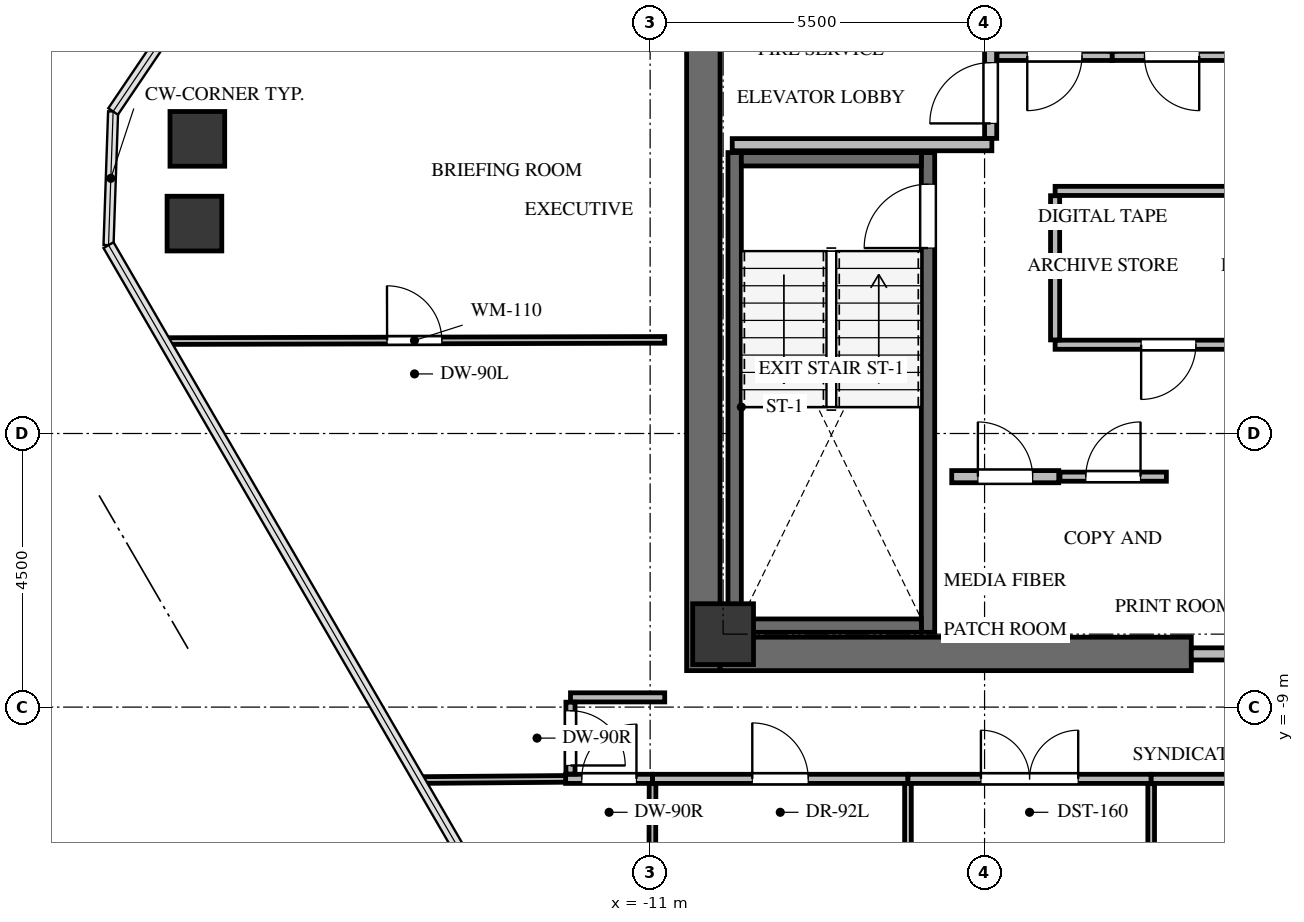
"""IFC4 building model, lengths in metres.
Left out: names, types, materials, properties, quantities, classifications, styles, units other than length and angle.
Written with IfcOpenShell. Run it as: python <this file> out.ifc"""

import sys

from ifc_helpers import new_model, si_unit, direction, frame, frame_2d, origin, origin_2d, place, context, subcontext, project, spatial, rectangle, extrude, source, transform, mapped, element, fill, save


model = new_model("IFC4")
c1 = context("Model", 3, precision=1e-05, world=origin(), true_north=direction((0.0, 1.0)))
c2 = subcontext(c1, "Body", "Model", "MODEL_VIEW")
j1 = project(units=[si_unit("LENGTHUNIT", "METRE"), si_unit("PLANEANGLEUNIT", "RADIAN")], contexts=[c1])
p1 = place(None, origin())
s1 = spatial("IfcSite", under=j1, at=p1, CompositionType="ELEMENT")
p2 = place(p1, origin())
s2 = spatial("IfcBuilding", under=s1, at=p2, CompositionType="ELEMENT")
p3 = place(p2, frame((0.0, 0.0, 244.7)))
s3 = spatial("IfcBuildingStorey", under=s2, at=p3, CompositionType="ELEMENT", Elevation=244.7)
p4 = place(p3, frame((-10.125, -8.4, 0.0), z_axis=(0.0, 0.0, 1.0), x_axis=(0.0, 1.0, 0.0)))
e1 = element("IfcWall", 1, at=p4, inside=s3, PredefinedType="SHEAR", context=c2, shape_type="SweptSolid", body=[
    extrude(rectangle(XDim=16.8, YDim=0.55, at=frame_2d((8.4, 0.0))), origin(), (0.0, 0.0, 1.0), 3.3),
])
p5 = place(p3, frame((-9.85, -8.125, 0.0), z_axis=(0.0, 0.0, 1.0), x_axis=(1.0, 0.0, 0.0)))
e2 = element("IfcWall", 2, at=p5, inside=s3, PredefinedType="SHEAR", context=c2, shape_type="SweptSolid", body=[
    extrude(rectangle(XDim=7.75, YDim=0.55, at=frame_2d((3.875, 0.0))), origin(), (0.0, 0.0, 1.0), 3.3),
])
p6 = place(p3, frame((-6.43, -7.77, -0.24), z_axis=(0.0, 0.0, 1.0), x_axis=(0.0, 1.0, 0.0)))
e3 = element("IfcWall", 3, at=p6, inside=s3, PredefinedType="SHEAR", context=c2, shape_type="SweptSolid", body=[
    extrude(rectangle(XDim=7.89, YDim=0.22, at=frame_2d((3.945, 0.0))), origin(), (0.0, 0.0, 1.0), 3.3),
])
p7 = place(p6, frame((6.32, 0.0, 0.0)))
e4 = element("IfcOpeningElement", 4, at=p7, cuts=e3, PredefinedType="OPENING", context=c2, shape_type="SweptSolid", body=[
    extrude(rectangle(XDim=1.05, YDim=2.15, at=frame_2d((0.525, 1.075))), frame((0.0, 0.12, 0.0), z_axis=(0.0, -1.0, 0.0), x_axis=(1.0, 0.0, 0.0)), (0.0, 0.0, 1.0), 0.24),
])
p8 = place(p3, frame((-9.61, 0.12, -0.24), z_axis=(0.0, 0.0, 1.0), x_axis=(0.0, -1.0, 0.0)))
e5 = element("IfcWall", 5, at=p8, inside=s3, PredefinedType="SHEAR", context=c2, shape_type="SweptSolid", body=[
    extrude(rectangle(XDim=7.89, YDim=0.22, at=frame_2d((3.945, 0.0))), origin(), (0.0, 0.0, 1.0), 3.3),
])
for number, where, z_axis, x_axis in (
    (6, (-9.5, -7.66, -0.24), (0.0, 0.0, 1.0), (1.0, 0.0, 0.0)),
    (7, (-6.54, 0.01, -0.24), (0.0, 0.0, 1.0), (-1.0, 0.0, 0.0)),
):
    element("IfcWall", number, at=place(p3, frame(where, z_axis=z_axis, x_axis=x_axis)), inside=s3, PredefinedType="SHEAR", context=c2, shape_type="SweptSolid", body=[
        extrude(rectangle(XDim=2.96, YDim=0.22, at=frame_2d((1.48, 0.0))), origin(), (0.0, 0.0, 1.0), 3.3),
    ])
m1 = source(origin(), c2, "Body", "SweptSolid", [
    extrude(rectangle(XDim=1.0, YDim=1.0, at=origin_2d()), origin(), (0.0, 0.0, 1.0), 3.3),
])
p9 = place(p3, frame((-9.8, -7.8, -0.24), z_axis=(0.0, 0.0, 1.0), x_axis=(1.0, 0.0, 0.0)))
e8 = element("IfcColumn", 8, at=p9, inside=s3, PredefinedType="COLUMN", context=c2, shape_type="MappedRepresentation", body=[
    mapped(m1, transform((0.0, 0.0, 0.0), x_axis=(1.0, 0.0, 0.0), y_axis=(0.0, 1.0, 0.0), z_axis=(0.0, 0.0, 1.0), scale=1.0)),
])
m2 = source(origin(), c2, "Body", "SweptSolid", [
    extrude(rectangle(XDim=0.9, YDim=0.9, at=origin_2d()), origin(), (0.0, 0.0, 1.0), 3.3),
])
for number, where, z_axis, x_axis in (
    (9, (-18.494, -1.048, -0.24), (0.0, 0.0, 1.0), (1.0, 0.0, 0.0)),
    (10, (-18.446, 0.346, -0.24), (0.0, 0.0, 1.0), (1.0, 0.0, 0.0)),
):
    element("IfcColumn", number, at=place(p3, frame(where, z_axis=z_axis, x_axis=x_axis)), inside=s3, PredefinedType="COLUMN", context=c2, shape_type="MappedRepresentation", body=[
        mapped(m2, transform((0.0, 0.0, 0.0), x_axis=(1.0, 0.0, 0.0), y_axis=(0.0, 1.0, 0.0), z_axis=(0.0, 0.0, 1.0), scale=1.0)),
    ])
p10 = place(p3, frame((-2.1, -8.125, 0.0), z_axis=(0.0, 0.0, 1.0), x_axis=(1.0, 0.0, 0.0)))
e11 = element("IfcWall", 11, at=p10, inside=s3, PredefinedType="SOLIDWALL", context=c2, shape_type="SweptSolid", body=[
    extrude(rectangle(XDim=4.2, YDim=0.2, at=frame_2d((2.1, 0.0))), origin(), (0.0, 0.0, 1.0), 3.045),
])
p11 = place(p10, frame((1.2, 0.0, 0.0)))
e12 = element("IfcOpeningElement", 12, at=p11, cuts=e11, PredefinedType="OPENING", context=c2, shape_type="SweptSolid", body=[
    extrude(rectangle(XDim=1.8, YDim=2.15, at=frame_2d((0.9, 1.075))), frame((0.0, 0.11, 0.0), z_axis=(0.0, -1.0, 0.0), x_axis=(1.0, 0.0, 0.0)), (0.0, 0.0, 1.0), 0.22),
])
p12 = place(p3, frame((-9.65, 0.25, 0.0), z_axis=(0.0, 0.0, 1.0), x_axis=(1.0, 0.0, 0.0)))
e13 = element("IfcWall", 13, at=p12, inside=s3, PredefinedType="SOLIDWALL", context=c2, shape_type="SweptSolid", body=[
    extrude(rectangle(XDim=4.27, YDim=0.2, at=frame_2d((2.135, 0.0))), origin(), (0.0, 0.0, 1.0), 3.045),
])
p13 = place(p3, frame((-5.4, 0.354, 0.0), z_axis=(0.0, 0.0, 1.0), x_axis=(0.0, 1.0, 0.0)))
e14 = element("IfcWall", 14, at=p13, inside=s3, PredefinedType="SOLIDWALL", context=c2, shape_type="SweptSolid", body=[
    extrude(rectangle(XDim=4.026, YDim=0.2, at=frame_2d((2.013, 0.0))), origin(), (0.0, 0.0, 1.0), 3.045),
])
p14 = place(p13, frame((0.246, 0.0, 0.0)))
e15 = element("IfcOpeningElement", 15, at=p14, cuts=e14, PredefinedType="OPENING", context=c2, shape_type="SweptSolid", body=[
    extrude(rectangle(XDim=1.0, YDim=2.15, at=frame_2d((0.5, 1.075))), frame((0.0, 0.11, 0.0), z_axis=(0.0, -1.0, 0.0), x_axis=(1.0, 0.0, 0.0)), (0.0, 0.0, 1.0), 0.22),
])
p15 = place(p3, frame((-6.04, -5.21, 0.0), z_axis=(0.0, 0.0, 1.0), x_axis=(1.0, 0.0, 0.0)))
e16 = element("IfcWall", 16, at=p15, inside=s3, PredefinedType="SOLIDWALL", context=c2, shape_type="SweptSolid", body=[
    extrude(rectangle(XDim=1.76, YDim=0.2, at=frame_2d((0.88, 0.0))), origin(), (0.0, 0.0, 1.0), 3.045),
])
p16 = place(p15, frame((0.43, 0.0, 0.0)))
e17 = element("IfcOpeningElement", 17, at=p16, cuts=e16, PredefinedType="OPENING", context=c2, shape_type="SweptSolid", body=[
    extrude(rectangle(XDim=0.9, YDim=2.05, at=frame_2d((0.45, 1.025))), frame((0.0, 0.11, 0.0), z_axis=(0.0, -1.0, 0.0), x_axis=(1.0, 0.0, 0.0)), (0.0, 0.0, 1.0), 0.22),
])
p17 = place(p3, frame((-4.26, -5.21, 0.0), z_axis=(0.0, 0.0, 1.0), x_axis=(1.0, 0.0, 0.0)))
e18 = element("IfcWall", 18, at=p17, inside=s3, PredefinedType="PARTITIONING", context=c2, shape_type="SweptSolid", body=[
    extrude(rectangle(XDim=1.75, YDim=0.15, at=frame_2d((0.875, 0.0))), origin(), (0.0, 0.0, 1.0), 3.045),
])
p18 = place(p17, frame((0.425, 0.0, 0.0)))
e19 = element("IfcOpeningElement", 19, at=p18, cuts=e18, PredefinedType="OPENING", context=c2, shape_type="SweptSolid", body=[
    extrude(rectangle(XDim=0.9, YDim=2.05, at=frame_2d((0.45, 1.025))), frame((0.0, 0.085, 0.0), z_axis=(0.0, -1.0, 0.0), x_axis=(1.0, 0.0, 0.0)), (0.0, 0.0, 1.0), 0.17),
])
p19 = place(p3, frame((-0.61, -3.04, 0.0), z_axis=(0.0, 0.0, 1.0), x_axis=(-1.0, 0.0, 0.0)))
e20 = element("IfcWall", 20, at=p19, inside=s3, PredefinedType="PARTITIONING", context=c2, shape_type="SweptSolid", body=[
    extrude(rectangle(XDim=3.73, YDim=0.15, at=frame_2d((1.865, 0.0))), origin(), (0.0, 0.0, 1.0), 3.045),
])
p20 = place(p19, frame((1.415, 0.0, 0.0)))
e21 = element("IfcOpeningElement", 21, at=p20, cuts=e20, PredefinedType="OPENING", context=c2, shape_type="SweptSolid", body=[
    extrude(rectangle(XDim=0.9, YDim=2.05, at=frame_2d((0.45, 1.025))), frame((0.0, 0.085, 0.0), z_axis=(0.0, -1.0, 0.0), x_axis=(1.0, 0.0, 0.0)), (0.0, 0.0, 1.0), 0.17),
])
p21 = place(p3, frame((-4.34, -0.51, 0.0), z_axis=(0.0, 0.0, 1.0), x_axis=(1.0, 0.0, 0.0)))
e22 = element("IfcWall", 22, at=p21, inside=s3, PredefinedType="PARTITIONING", context=c2, shape_type="SweptSolid", body=[
    extrude(rectangle(XDim=3.73, YDim=0.15, at=frame_2d((1.865, 0.0))), origin(), (0.0, 0.0, 1.0), 3.045),
])
p22 = place(p3, frame((-4.34, -2.961, 0.0), z_axis=(0.0, 0.0, 1.0), x_axis=(0.0, 1.0, 0.0)))
e23 = element("IfcWall", 23, at=p22, inside=s3, PredefinedType="PARTITIONING", context=c2, shape_type="SweptSolid", body=[
    extrude(rectangle(XDim=2.372, YDim=0.15, at=frame_2d((1.186, 0.0))), origin(), (0.0, 0.0, 1.0), 3.045),
])
p23 = place(p3, frame((-3.4, 1.71, 0.0), z_axis=(0.0, 0.0, 1.0), x_axis=(-1.0, 0.0, 0.0)))
e24 = element("IfcWall", 24, at=p23, inside=s3, PredefinedType="PARTITIONING", context=c2, shape_type="SweptSolid", body=[
    extrude(rectangle(XDim=1.896, YDim=0.15, at=frame_2d((0.948, 0.0))), origin(), (0.0, 0.0, 1.0), 3.045),
])
p24 = place(p23, frame((0.498, 0.0, 0.0)))
e25 = element("IfcOpeningElement", 25, at=p24, cuts=e24, PredefinedType="OPENING", context=c2, shape_type="SweptSolid", body=[
    extrude(rectangle(XDim=0.9, YDim=2.05, at=frame_2d((0.45, 1.025))), frame((0.0, 0.085, 0.0), z_axis=(0.0, -1.0, 0.0), x_axis=(1.0, 0.0, 0.0)), (0.0, 0.0, 1.0), 0.17),
])
p25 = place(p3, frame((-1.44, 1.71, 0.0), z_axis=(0.0, 0.0, 1.0), x_axis=(-1.0, 0.0, 0.0)))
e26 = element("IfcWall", 26, at=p25, inside=s3, PredefinedType="PARTITIONING", context=c2, shape_type="SweptSolid", body=[
    extrude(rectangle(XDim=1.96, YDim=0.15, at=frame_2d((0.98, 0.0))), origin(), (0.0, 0.0, 1.0), 3.045),
])
p26 = place(p25, frame((0.53, 0.0, 0.0)))
e27 = element("IfcOpeningElement", 27, at=p26, cuts=e26, PredefinedType="OPENING", context=c2, shape_type="SweptSolid", body=[
    extrude(rectangle(XDim=0.9, YDim=2.05, at=frame_2d((0.45, 1.025))), frame((0.0, 0.085, 0.0), z_axis=(0.0, -1.0, 0.0), x_axis=(1.0, 0.0, 0.0)), (0.0, 0.0, 1.0), 0.17),
])
p27 = place(p3, frame((-12.39, -10.18, 0.0), z_axis=(0.0, 0.0, 1.0), x_axis=(1.0, 0.0, 0.0)))
e28 = element("IfcWall", 28, at=p27, inside=s3, PredefinedType="PARTITIONING", context=c2, shape_type="SweptSolid", body=[
    extrude(rectangle(XDim=1.43, YDim=0.15, at=frame_2d((0.715, 0.0))), origin(), (0.0, 0.0, 1.0), 3.045),
])
p28 = place(p27, frame((0.265, 0.0, 0.0)))
e29 = element("IfcOpeningElement", 29, at=p28, cuts=e28, PredefinedType="OPENING", context=c2, shape_type="SweptSolid", body=[
    extrude(rectangle(XDim=0.9, YDim=2.05, at=frame_2d((0.45, 1.025))), frame((0.0, 0.085, 0.0), z_axis=(0.0, -1.0, 0.0), x_axis=(1.0, 0.0, 0.0)), (0.0, 0.0, 1.0), 0.17),
])
p29 = place(p3, frame((-10.96, -10.18, 0.0), z_axis=(0.0, 0.0, 1.0), x_axis=(1.0, 0.0, 0.0)))
e30 = element("IfcWall", 30, at=p29, inside=s3, PredefinedType="PARTITIONING", context=c2, shape_type="SweptSolid", body=[
    extrude(rectangle(XDim=4.2, YDim=0.15, at=frame_2d((2.1, 0.0))), origin(), (0.0, 0.0, 1.0), 3.045),
])
p30 = place(p29, frame((1.64, 0.0, 0.0)))
e31 = element("IfcOpeningElement", 31, at=p30, cuts=e30, PredefinedType="OPENING", context=c2, shape_type="SweptSolid", body=[
    extrude(rectangle(XDim=0.92, YDim=2.1, at=frame_2d((0.46, 1.05))), frame((0.0, 0.085, 0.0), z_axis=(0.0, -1.0, 0.0), x_axis=(1.0, 0.0, 0.0)), (0.0, 0.0, 1.0), 0.17),
])
p31 = place(p3, frame((-6.76, -10.18, 0.0), z_axis=(0.0, 0.0, 1.0), x_axis=(1.0, 0.0, 0.0)))
e32 = element("IfcWall", 32, at=p31, inside=s3, PredefinedType="PARTITIONING", context=c2, shape_type="SweptSolid", body=[
    extrude(rectangle(XDim=4.0, YDim=0.15, at=frame_2d((2.0, 0.0))), origin(), (0.0, 0.0, 1.0), 2.301),
])
p32 = place(p31, frame((1.2, 0.0, 0.0)))
e33 = element("IfcOpeningElement", 33, at=p32, cuts=e32, PredefinedType="OPENING", context=c2, shape_type="SweptSolid", body=[
    extrude(rectangle(XDim=1.6, YDim=2.15, at=frame_2d((0.8, 1.075))), frame((0.0, 0.085, 0.0), z_axis=(0.0, -1.0, 0.0), x_axis=(1.0, 0.0, 0.0)), (0.0, 0.0, 1.0), 0.17),
])
p33 = place(p3, frame((-2.76, -10.18, 0.0), z_axis=(0.0, 0.0, 1.0), x_axis=(1.0, 0.0, 0.0)))
e34 = element("IfcWall", 34, at=p33, inside=s3, PredefinedType="PARTITIONING", context=c2, shape_type="SweptSolid", body=[
    extrude(rectangle(XDim=1.671, YDim=0.15, at=frame_2d((0.835, 0.0))), origin(), (0.0, 0.0, 1.0), 3.045),
])
p34 = place(p3, frame((-10.76, -8.84, 0.0), z_axis=(0.0, 0.0, 1.0), x_axis=(-1.0, 0.0, 0.0)))
e35 = element("IfcWall", 35, at=p34, inside=s3, PredefinedType="PARTITIONING", context=c2, shape_type="SweptSolid", body=[
    extrude(rectangle(XDim=1.55, YDim=0.15, at=frame_2d((0.775, 0.0))), origin(), (0.0, 0.0, 1.0), 3.045),
])
p35 = place(p3, frame((-12.31, -8.919, 0.0), z_axis=(0.0, 0.0, 1.0), x_axis=(0.0, -1.0, 0.0)))
e36 = element("IfcWall", 36, at=p35, inside=s3, PredefinedType="PARTITIONING", context=c2, shape_type="SweptSolid", body=[
    extrude(rectangle(XDim=1.182, YDim=0.15, at=frame_2d((0.591, 0.0))), origin(), (0.0, 0.0, 1.0), 3.045),
])
p36 = place(p35, frame((0.141, 0.0, 0.0)))
e37 = element("IfcOpeningElement", 37, at=p36, cuts=e36, PredefinedType="OPENING", context=c2, shape_type="SweptSolid", body=[
    extrude(rectangle(XDim=0.9, YDim=2.05, at=frame_2d((0.45, 1.025))), frame((0.0, 0.085, 0.0), z_axis=(0.0, -1.0, 0.0), x_axis=(1.0, 0.0, 0.0)), (0.0, 0.0, 1.0), 0.17),
])
p37 = place(p3, frame((-10.96, -10.259, 0.0), z_axis=(0.0, 0.0, 1.0), x_axis=(-0.003240981611, -0.999994748005, 0.0)))
e38 = element("IfcWall", 38, at=p37, inside=s3, PredefinedType="MOVABLE", context=c2, shape_type="SweptSolid", body=[
    extrude(rectangle(XDim=4.821, YDim=0.11, at=frame_2d((2.411, 0.0))), origin(), (0.0, 0.0, 1.0), 2.399),
])
p38 = place(p3, frame((-14.802, -10.2, 0.0), z_axis=(0.0, 0.0, 1.0), x_axis=(0.999968020968, 0.007997314604, 0.0)))
e39 = element("IfcWall", 39, at=p38, inside=s3, PredefinedType="MOVABLE", context=c2, shape_type="SweptSolid", body=[
    extrude(rectangle(XDim=2.412, YDim=0.11, at=frame_2d((1.206, 0.0))), origin(), (0.0, 0.0, 1.0), 2.399),
])
p39 = place(p3, frame((-6.76, -10.259, 0.0), z_axis=(0.0, 0.0, 1.0), x_axis=(0.0, -1.0, 0.0)))
e40 = element("IfcWall", 40, at=p39, inside=s3, PredefinedType="MOVABLE", context=c2, shape_type="SweptSolid", body=[
    extrude(rectangle(XDim=6.927, YDim=0.11, at=frame_2d((3.463, 0.0))), origin(), (0.0, 0.0, 1.0), 2.301),
])
p40 = place(p3, frame((-2.76, -10.259, 0.0), z_axis=(0.0, 0.0, 1.0), x_axis=(0.0, -1.0, 0.0)))
e41 = element("IfcWall", 41, at=p40, inside=s3, PredefinedType="MOVABLE", context=c2, shape_type="SweptSolid", body=[
    extrude(rectangle(XDim=6.927, YDim=0.11, at=frame_2d((3.463, 0.0))), origin(), (0.0, 0.0, 1.0), 2.399),
])
p41 = place(p3, frame((-18.992, -2.98, 0.0), z_axis=(0.0, 0.0, 1.0), x_axis=(0.999997042683, 0.0024320004, 0.0)))
e42 = element("IfcWall", 42, at=p41, inside=s3, PredefinedType="MOVABLE", context=c2, shape_type="SweptSolid", body=[
    extrude(rectangle(XDim=8.232, YDim=0.11, at=frame_2d((4.116, 0.0))), origin(), (0.0, 0.0, 1.0), 2.399),
])
p42 = place(p41, frame((3.666, 0.0, 0.0)))
e43 = element("IfcOpeningElement", 43, at=p42, cuts=e42, PredefinedType="OPENING", context=c2, shape_type="SweptSolid", body=[
    extrude(rectangle(XDim=0.9, YDim=2.05, at=frame_2d((0.45, 1.025))), frame((0.0, 0.065, 0.0), z_axis=(0.0, -1.0, 0.0), x_axis=(1.0, 0.0, 0.0)), (0.0, 0.0, 1.0), 0.13),
])
m3 = source(origin(), c2, "Body", "SweptSolid", [
    extrude(rectangle(XDim=1.05, YDim=2.15, at=frame_2d((0.525, 1.075))), frame((0.0, 0.025, 0.0), z_axis=(0.0, -1.0, 0.0), x_axis=(1.0, 0.0, 0.0)), (0.0, 0.0, 1.0), 0.05),
])
p43 = place(p7, origin())
e44 = element("IfcDoor", 44, at=p43, inside=s3, OperationType="SINGLE_SWING_LEFT", PredefinedType="DOOR", context=c2, shape_type="MappedRepresentation", body=[
    mapped(m3, transform((0.0, 0.0, 0.0), x_axis=(1.0, 0.0, 0.0), y_axis=(0.0, 1.0, 0.0), z_axis=(0.0, 0.0, 1.0), scale=1.0)),
])
fill(e4, e44)
m4 = source(origin(), c2, "Body", "SweptSolid", [
    extrude(rectangle(XDim=1.0, YDim=2.15, at=frame_2d((0.5, 1.075))), frame((0.0, 0.025, 0.0), z_axis=(0.0, -1.0, 0.0), x_axis=(1.0, 0.0, 0.0)), (0.0, 0.0, 1.0), 0.05),
])
p44 = place(p14, origin())
e45 = element("IfcDoor", 45, at=p44, inside=s3, OperationType="SINGLE_SWING_LEFT", PredefinedType="DOOR", context=c2, shape_type="MappedRepresentation", body=[
    mapped(m4, transform((0.0, 0.0, 0.0), x_axis=(1.0, 0.0, 0.0), y_axis=(0.0, 1.0, 0.0), z_axis=(0.0, 0.0, 1.0), scale=1.0)),
])
fill(e15, e45)
m5 = source(origin(), c2, "Body", "SweptSolid", [
    extrude(rectangle(XDim=0.9, YDim=2.05, at=frame_2d((0.45, 1.025))), frame((0.0, 0.025, 0.0), z_axis=(0.0, -1.0, 0.0), x_axis=(1.0, 0.0, 0.0)), (0.0, 0.0, 1.0), 0.05),
])
p45 = place(p16, origin())
e46 = element("IfcDoor", 46, at=p45, inside=s3, OperationType="SINGLE_SWING_LEFT", PredefinedType="DOOR", context=c2, shape_type="MappedRepresentation", body=[
    mapped(m5, transform((0.0, 0.0, 0.0), x_axis=(1.0, 0.0, 0.0), y_axis=(0.0, 1.0, 0.0), z_axis=(0.0, 0.0, 1.0), scale=1.0)),
])
fill(e17, e46)
m6 = source(origin(), c2, "Body", "SweptSolid", [
    extrude(rectangle(XDim=0.9, YDim=2.05, at=frame_2d((0.45, 1.025))), frame((0.0, 0.025, 0.0), z_axis=(0.0, -1.0, 0.0), x_axis=(1.0, 0.0, 0.0)), (0.0, 0.0, 1.0), 0.05),
])
p46 = place(p18, origin())
e47 = element("IfcDoor", 47, at=p46, inside=s3, OperationType="SINGLE_SWING_RIGHT", PredefinedType="DOOR", context=c2, shape_type="MappedRepresentation", body=[
    mapped(m6, transform((0.0, 0.0, 0.0), x_axis=(1.0, 0.0, 0.0), y_axis=(0.0, 1.0, 0.0), z_axis=(0.0, 0.0, 1.0), scale=1.0)),
])
fill(e19, e47)
p47 = place(p20, origin())
e48 = element("IfcDoor", 48, at=p47, inside=s3, OperationType="SINGLE_SWING_RIGHT", PredefinedType="DOOR", context=c2, shape_type="MappedRepresentation", body=[
    mapped(m6, transform((0.0, 0.0, 0.0), x_axis=(1.0, 0.0, 0.0), y_axis=(0.0, 1.0, 0.0), z_axis=(0.0, 0.0, 1.0), scale=1.0)),
])
fill(e21, e48)
p48 = place(p24, origin())
e49 = element("IfcDoor", 49, at=p48, inside=s3, OperationType="SINGLE_SWING_RIGHT", PredefinedType="DOOR", context=c2, shape_type="MappedRepresentation", body=[
    mapped(m6, transform((0.0, 0.0, 0.0), x_axis=(1.0, 0.0, 0.0), y_axis=(0.0, 1.0, 0.0), z_axis=(0.0, 0.0, 1.0), scale=1.0)),
])
fill(e25, e49)
p49 = place(p26, origin())
e50 = element("IfcDoor", 50, at=p49, inside=s3, OperationType="SINGLE_SWING_LEFT", PredefinedType="DOOR", context=c2, shape_type="MappedRepresentation", body=[
    mapped(m5, transform((0.0, 0.0, 0.0), x_axis=(1.0, 0.0, 0.0), y_axis=(0.0, 1.0, 0.0), z_axis=(0.0, 0.0, 1.0), scale=1.0)),
])
fill(e27, e50)
m7 = source(origin(), c2, "Body", "SweptSolid", [
    extrude(rectangle(XDim=0.9, YDim=2.05, at=frame_2d((0.45, 1.025))), frame((0.0, 0.025, 0.0), z_axis=(0.0, -1.0, 0.0), x_axis=(1.0, 0.0, 0.0)), (0.0, 0.0, 1.0), 0.05),
])
p50 = place(p28, origin())
e51 = element("IfcDoor", 51, at=p50, inside=s3, OperationType="SINGLE_SWING_RIGHT", PredefinedType="DOOR", context=c2, shape_type="MappedRepresentation", body=[
    mapped(m7, transform((0.0, 0.0, 0.0), x_axis=(1.0, 0.0, 0.0), y_axis=(0.0, 1.0, 0.0), z_axis=(0.0, 0.0, 1.0), scale=1.0)),
])
fill(e29, e51)
m8 = source(origin(), c2, "Body", "SweptSolid", [
    extrude(rectangle(XDim=0.92, YDim=2.1, at=frame_2d((0.46, 1.05))), frame((0.0, 0.025, 0.0), z_axis=(0.0, -1.0, 0.0), x_axis=(1.0, 0.0, 0.0)), (0.0, 0.0, 1.0), 0.05),
])
p51 = place(p30, origin())
e52 = element("IfcDoor", 52, at=p51, inside=s3, OperationType="SINGLE_SWING_LEFT", PredefinedType="DOOR", context=c2, shape_type="MappedRepresentation", body=[
    mapped(m8, transform((0.0, 0.0, 0.0), x_axis=(1.0, 0.0, 0.0), y_axis=(0.0, 1.0, 0.0), z_axis=(0.0, 0.0, 1.0), scale=1.0)),
])
fill(e31, e52)
m9 = source(origin(), c2, "Body", "SweptSolid", [
    extrude(rectangle(XDim=1.6, YDim=2.15, at=frame_2d((0.8, 1.075))), frame((0.0, 0.025, 0.0), z_axis=(0.0, -1.0, 0.0), x_axis=(1.0, 0.0, 0.0)), (0.0, 0.0, 1.0), 0.05),
])
p52 = place(p32, origin())
e53 = element("IfcDoor", 53, at=p52, inside=s3, OperationType="DOUBLE_DOOR_SINGLE_SWING", PredefinedType="DOOR", context=c2, shape_type="MappedRepresentation", body=[
    mapped(m9, transform((0.0, 0.0, 0.0), x_axis=(1.0, 0.0, 0.0), y_axis=(0.0, 1.0, 0.0), z_axis=(0.0, 0.0, 1.0), scale=1.0)),
])
fill(e33, e53)
p53 = place(p36, origin())
e54 = element("IfcDoor", 54, at=p53, inside=s3, OperationType="SINGLE_SWING_RIGHT", PredefinedType="DOOR", context=c2, shape_type="MappedRepresentation", body=[
    mapped(m7, transform((0.0, 0.0, 0.0), x_axis=(1.0, 0.0, 0.0), y_axis=(0.0, 1.0, 0.0), z_axis=(0.0, 0.0, 1.0), scale=1.0)),
])
fill(e37, e54)
m10 = source(origin(), c2, "Body", "SweptSolid", [
    extrude(rectangle(XDim=0.9, YDim=2.05, at=frame_2d((0.45, 1.025))), frame((0.0, 0.025, 0.0), z_axis=(0.0, -1.0, 0.0), x_axis=(1.0, 0.0, 0.0)), (0.0, 0.0, 1.0), 0.05),
])
p54 = place(p42, origin())
e55 = element("IfcDoor", 55, at=p54, inside=s3, OperationType="SINGLE_SWING_LEFT", PredefinedType="DOOR", context=c2, shape_type="MappedRepresentation", body=[
    mapped(m10, transform((0.0, 0.0, 0.0), x_axis=(1.0, 0.0, 0.0), y_axis=(0.0, 1.0, 0.0), z_axis=(0.0, 0.0, 1.0), scale=1.0)),
])
fill(e43, e55)
save(model, sys.argv[1])
